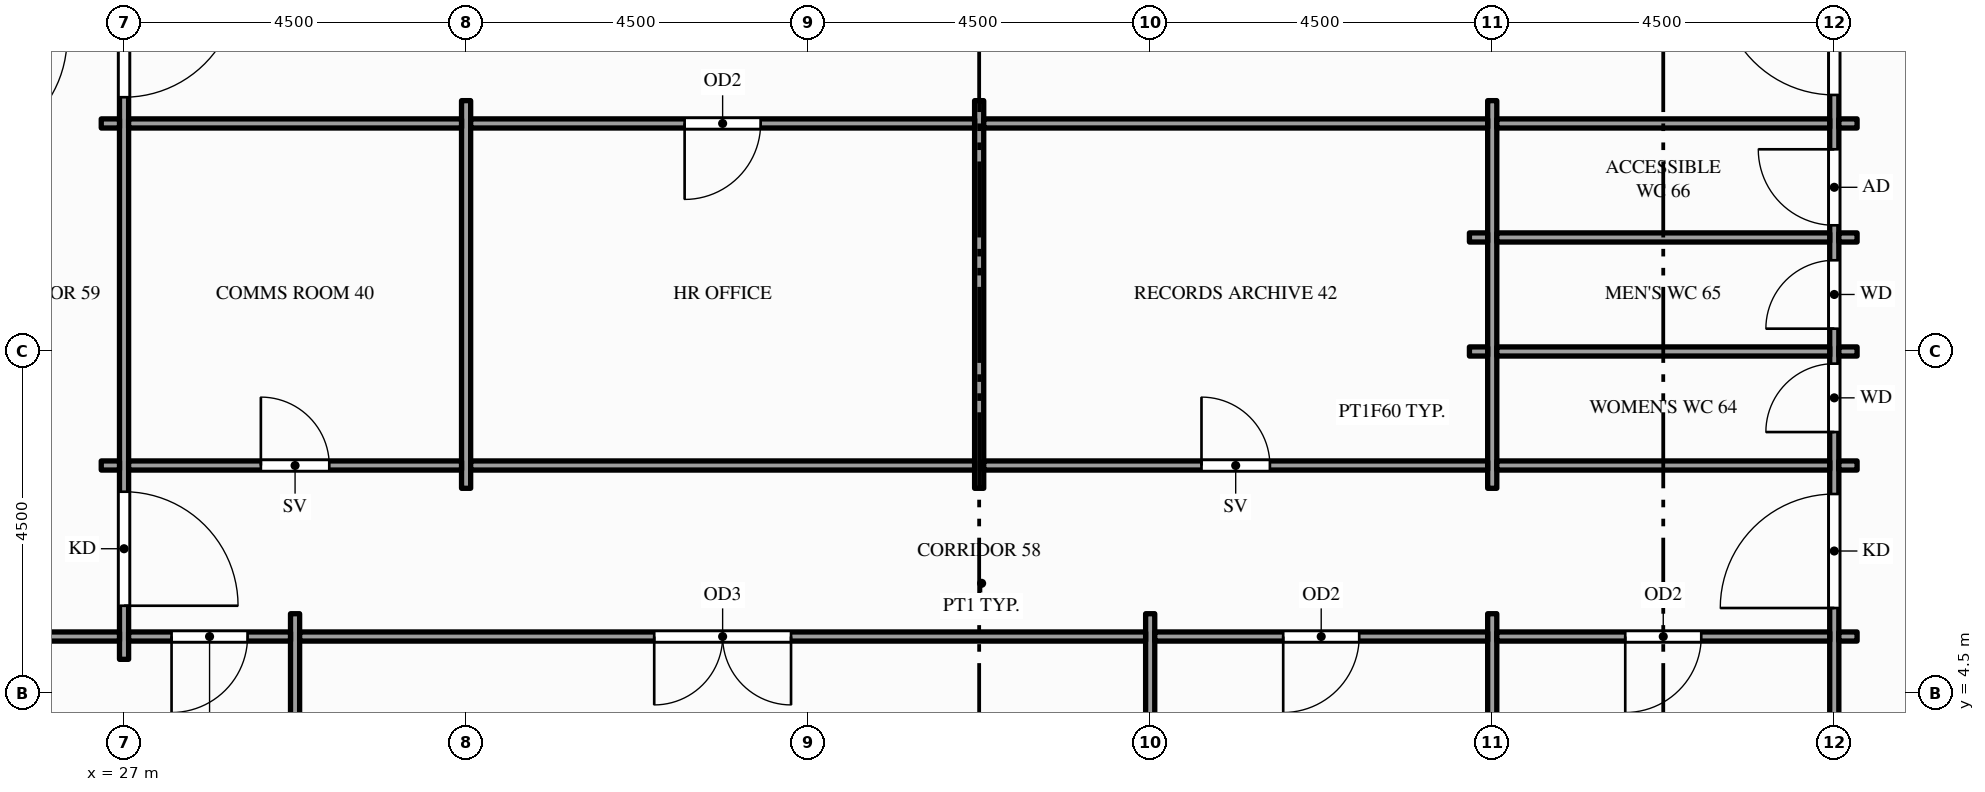
"""IFC4 building model, lengths in metres.
Left out: names, types, materials, properties, quantities, classifications, styles, units other than length and angle.
Written with IfcOpenShell. Run it as: python <this file> out.ifc"""

import sys

from ifc_helpers import new_model, si_unit, direction, frame, frame_2d, origin, place, context, subcontext, project, spatial, rectangle, extrude, element, fill, save


model = new_model("IFC4")
c1 = context("Model", 3, precision=1e-05, world=origin(), true_north=direction((0.0, 1.0)))
c2 = subcontext(c1, "Body", "Model", "MODEL_VIEW")
j1 = project(units=[si_unit("LENGTHUNIT", "METRE"), si_unit("PLANEANGLEUNIT", "RADIAN")], contexts=[c1])
p1 = place(None, origin())
s1 = spatial("IfcSite", under=j1, at=p1, CompositionType="ELEMENT")
p2 = place(p1, origin())
s2 = spatial("IfcBuilding", under=s1, at=p2, CompositionType="ELEMENT")
p3 = place(p2, frame((0.0, 0.0, 239.0)))
s3 = spatial("IfcBuildingStorey", under=s2, at=p3, CompositionType="ELEMENT", Elevation=239.0)
p4 = place(p3, frame((27.0, 4.95, 0.0), z_axis=(0.0, 0.0, 1.0), x_axis=(0.0, 1.0, 0.0)))
e1 = element("IfcWall", 1, at=p4, inside=s3, PredefinedType="PARTITIONING", context=c2, shape_type="SweptSolid", body=[
    extrude(rectangle(XDim=9.6, YDim=0.12, at=frame_2d((4.8, 0.0))), origin(), (0.0, 0.0, 1.0), 2.77),
])
p5 = place(p4, frame((0.705, 0.0, 0.0)))
e2 = element("IfcOpeningElement", 2, at=p5, cuts=e1, PredefinedType="OPENING", context=c2, shape_type="SweptSolid", body=[
    extrude(rectangle(XDim=1.5, YDim=2.1, at=frame_2d((0.75, 1.05))), frame((0.0, 0.07, 0.0), z_axis=(0.0, -1.0, 0.0), x_axis=(1.0, 0.0, 0.0)), (0.0, 0.0, 1.0), 0.14),
])
p6 = place(p4, frame((7.395, 0.0, 0.0)))
e3 = element("IfcOpeningElement", 3, at=p6, cuts=e1, PredefinedType="OPENING", context=c2, shape_type="SweptSolid", body=[
    extrude(rectangle(XDim=1.5, YDim=2.1, at=frame_2d((0.75, 1.05))), frame((0.0, 0.07, 0.0), z_axis=(0.0, -1.0, 0.0), x_axis=(1.0, 0.0, 0.0)), (0.0, 0.0, 1.0), 0.14),
])
p7 = place(p3, frame((29.25, -1.35, 0.0), z_axis=(0.0, 0.0, 1.0), x_axis=(0.0, 1.0, 0.0)))
e4 = element("IfcWall", 4, at=p7, inside=s3, PredefinedType="PARTITIONING", context=c2, shape_type="SweptSolid", body=[
    extrude(rectangle(XDim=6.9, YDim=0.12, at=frame_2d((3.45, 0.0))), origin(), (0.0, 0.0, 1.0), 2.72),
])
for number, where, z_axis, x_axis in (
    (5, (31.5, 7.2, 0.0), (0.0, 0.0, 1.0), (0.0, 1.0, 0.0)),
    (6, (38.25, 7.2, 0.0), (0.0, 0.0, 1.0), (0.0, 1.0, 0.0)),
):
    element("IfcWall", number, at=place(p3, frame(where, z_axis=z_axis, x_axis=x_axis)), inside=s3, PredefinedType="PARTITIONING", context=c2, shape_type="SweptSolid", body=[
        extrude(rectangle(XDim=5.1, YDim=0.12, at=frame_2d((2.55, 0.0))), origin(), (0.0, 0.0, 1.0), 2.77),
    ])
for number, where, z_axis, x_axis in (
    (7, (40.5, -1.35, 0.0), (0.0, 0.0, 1.0), (0.0, 1.0, 0.0)),
    (8, (45.0, -1.35, 0.0), (0.0, 0.0, 1.0), (0.0, 1.0, 0.0)),
):
    element("IfcWall", number, at=place(p3, frame(where, z_axis=z_axis, x_axis=x_axis)), inside=s3, PredefinedType="PARTITIONING", context=c2, shape_type="SweptSolid", body=[
        extrude(rectangle(XDim=6.9, YDim=0.12, at=frame_2d((3.45, 0.0))), origin(), (0.0, 0.0, 1.0), 2.3),
    ])
p8 = place(p3, frame((45.0, 7.2, 0.0), z_axis=(0.0, 0.0, 1.0), x_axis=(0.0, 1.0, 0.0)))
e9 = element("IfcWall", 9, at=p8, inside=s3, PredefinedType="PARTITIONING", context=c2, shape_type="SweptSolid", body=[
    extrude(rectangle(XDim=5.1, YDim=0.12, at=frame_2d((2.55, 0.0))), origin(), (0.0, 0.0, 1.0), 2.77),
])
p9 = place(p3, frame((49.5, -1.35, 0.0), z_axis=(0.0, 0.0, 1.0), x_axis=(0.0, 1.0, 0.0)))
e10 = element("IfcWall", 10, at=p9, inside=s3, PredefinedType="PARTITIONING", context=c2, shape_type="SweptSolid", body=[
    extrude(rectangle(XDim=22.2, YDim=0.12, at=frame_2d((11.1, 0.0))), origin(), (0.0, 0.0, 1.0), 2.3),
])
p10 = place(p9, frame((6.975, 0.0, 0.0)))
e11 = element("IfcOpeningElement", 11, at=p10, cuts=e10, PredefinedType="OPENING", context=c2, shape_type="SweptSolid", body=[
    extrude(rectangle(XDim=1.5, YDim=2.1, at=frame_2d((0.75, 1.05))), frame((0.0, 0.07, 0.0), z_axis=(0.0, -1.0, 0.0), x_axis=(1.0, 0.0, 0.0)), (0.0, 0.0, 1.0), 0.14),
])
p11 = place(p9, frame((13.725, 0.0, 0.0)))
e12 = element("IfcOpeningElement", 12, at=p11, cuts=e10, PredefinedType="OPENING", context=c2, shape_type="SweptSolid", body=[
    extrude(rectangle(XDim=1.5, YDim=2.1, at=frame_2d((0.75, 1.05))), frame((0.0, 0.07, 0.0), z_axis=(0.0, -1.0, 0.0), x_axis=(1.0, 0.0, 0.0)), (0.0, 0.0, 1.0), 0.14),
])
p12 = place(p9, frame((9.29, 0.0, 0.0)))
e13 = element("IfcOpeningElement", 13, at=p12, cuts=e10, PredefinedType="OPENING", context=c2, shape_type="SweptSolid", body=[
    extrude(rectangle(XDim=0.9, YDim=2.1, at=frame_2d((0.45, 1.05))), frame((0.0, 0.07, 0.0), z_axis=(0.0, -1.0, 0.0), x_axis=(1.0, 0.0, 0.0)), (0.0, 0.0, 1.0), 0.14),
])
p13 = place(p9, frame((10.65, 0.0, 0.0)))
e14 = element("IfcOpeningElement", 14, at=p13, cuts=e10, PredefinedType="OPENING", context=c2, shape_type="SweptSolid", body=[
    extrude(rectangle(XDim=0.9, YDim=2.1, at=frame_2d((0.45, 1.05))), frame((0.0, 0.07, 0.0), z_axis=(0.0, -1.0, 0.0), x_axis=(1.0, 0.0, 0.0)), (0.0, 0.0, 1.0), 0.14),
])
p14 = place(p9, frame((12.01, 0.0, 0.0)))
e15 = element("IfcOpeningElement", 15, at=p14, cuts=e10, PredefinedType="OPENING", context=c2, shape_type="SweptSolid", body=[
    extrude(rectangle(XDim=1.0, YDim=2.1, at=frame_2d((0.5, 1.05))), frame((0.0, 0.07, 0.0), z_axis=(0.0, -1.0, 0.0), x_axis=(1.0, 0.0, 0.0)), (0.0, 0.0, 1.0), 0.14),
])
p15 = place(p3, frame((24.81, 5.25, 0.0), z_axis=(0.0, 0.0, 1.0), x_axis=(1.0, 0.0, 0.0)))
e16 = element("IfcWall", 16, at=p15, inside=s3, PredefinedType="PARTITIONING", context=c2, shape_type="SweptSolid", body=[
    extrude(rectangle(XDim=2.13, YDim=0.12, at=frame_2d((1.065, 0.0))), origin(), (0.0, 0.0, 1.0), 2.77),
])
p16 = place(p3, frame((27.06, 5.25, 0.0), z_axis=(0.0, 0.0, 1.0), x_axis=(1.0, 0.0, 0.0)))
e17 = element("IfcWall", 17, at=p16, inside=s3, PredefinedType="PARTITIONING", context=c2, shape_type="SweptSolid", body=[
    extrude(rectangle(XDim=2.13, YDim=0.12, at=frame_2d((1.065, 0.0))), origin(), (0.0, 0.0, 1.0), 2.77),
])
p17 = place(p16, frame((0.565, 0.0, 0.0)))
e18 = element("IfcOpeningElement", 18, at=p17, cuts=e17, PredefinedType="OPENING", context=c2, shape_type="SweptSolid", body=[
    extrude(rectangle(XDim=1.0, YDim=2.1, at=frame_2d((0.5, 1.05))), frame((0.0, 0.07, 0.0), z_axis=(0.0, -1.0, 0.0), x_axis=(1.0, 0.0, 0.0)), (0.0, 0.0, 1.0), 0.14),
])
p18 = place(p3, frame((29.31, 5.25, 0.0), z_axis=(0.0, 0.0, 1.0), x_axis=(1.0, 0.0, 0.0)))
e19 = element("IfcWall", 19, at=p18, inside=s3, PredefinedType="PARTITIONING", context=c2, shape_type="SweptSolid", body=[
    extrude(rectangle(XDim=11.13, YDim=0.12, at=frame_2d((5.565, 0.0))), origin(), (0.0, 0.0, 1.0), 2.77),
])
p19 = place(p18, frame((4.665, 0.0, 0.0)))
e20 = element("IfcOpeningElement", 20, at=p19, cuts=e19, PredefinedType="OPENING", context=c2, shape_type="SweptSolid", body=[
    extrude(rectangle(XDim=1.8, YDim=2.1, at=frame_2d((0.9, 1.05))), frame((0.0, 0.07, 0.0), z_axis=(0.0, -1.0, 0.0), x_axis=(1.0, 0.0, 0.0)), (0.0, 0.0, 1.0), 0.14),
])
p20 = place(p3, frame((40.56, 5.25, 0.0), z_axis=(0.0, 0.0, 1.0), x_axis=(1.0, 0.0, 0.0)))
e21 = element("IfcWall", 21, at=p20, inside=s3, PredefinedType="PARTITIONING", context=c2, shape_type="SweptSolid", body=[
    extrude(rectangle(XDim=4.38, YDim=0.12, at=frame_2d((2.19, 0.0))), origin(), (0.0, 0.0, 1.0), 2.77),
])
p21 = place(p20, frame((1.69, 0.0, 0.0)))
e22 = element("IfcOpeningElement", 22, at=p21, cuts=e21, PredefinedType="OPENING", context=c2, shape_type="SweptSolid", body=[
    extrude(rectangle(XDim=1.0, YDim=2.1, at=frame_2d((0.5, 1.05))), frame((0.0, 0.07, 0.0), z_axis=(0.0, -1.0, 0.0), x_axis=(1.0, 0.0, 0.0)), (0.0, 0.0, 1.0), 0.14),
])
p22 = place(p3, frame((45.06, 5.25, 0.0), z_axis=(0.0, 0.0, 1.0), x_axis=(1.0, 0.0, 0.0)))
e23 = element("IfcWall", 23, at=p22, inside=s3, PredefinedType="PARTITIONING", context=c2, shape_type="SweptSolid", body=[
    extrude(rectangle(XDim=4.38, YDim=0.12, at=frame_2d((2.19, 0.0))), origin(), (0.0, 0.0, 1.0), 2.77),
])
p23 = place(p22, frame((1.69, 0.0, 0.0)))
e24 = element("IfcOpeningElement", 24, at=p23, cuts=e23, PredefinedType="OPENING", context=c2, shape_type="SweptSolid", body=[
    extrude(rectangle(XDim=1.0, YDim=2.1, at=frame_2d((0.5, 1.05))), frame((0.0, 0.07, 0.0), z_axis=(0.0, -1.0, 0.0), x_axis=(1.0, 0.0, 0.0)), (0.0, 0.0, 1.0), 0.14),
])
for number, where, z_axis, x_axis in (
    (25, (49.56, 5.25, 0.0), (0.0, 0.0, 1.0), (1.0, 0.0, 0.0)),
    (26, (26.7, 7.5, 0.0), (0.0, 0.0, 1.0), (1.0, 0.0, 0.0)),
):
    element("IfcWall", number, at=place(p3, frame(where, z_axis=z_axis, x_axis=x_axis)), inside=s3, PredefinedType="PARTITIONING", context=c2, shape_type="SweptSolid", body=[
        extrude(rectangle(XDim=0.24, YDim=0.12, at=frame_2d((0.12, 0.0))), origin(), (0.0, 0.0, 1.0), 2.77),
    ])
p24 = place(p3, frame((27.06, 7.5, 0.0), z_axis=(0.0, 0.0, 1.0), x_axis=(1.0, 0.0, 0.0)))
e27 = element("IfcWall", 27, at=p24, inside=s3, PredefinedType="PARTITIONING", context=c2, shape_type="SweptSolid", body=[
    extrude(rectangle(XDim=4.38, YDim=0.12, at=frame_2d((2.19, 0.0))), origin(), (0.0, 0.0, 1.0), 2.77),
])
p25 = place(p24, frame((1.74, 0.0, 0.0)))
e28 = element("IfcOpeningElement", 28, at=p25, cuts=e27, PredefinedType="OPENING", context=c2, shape_type="SweptSolid", body=[
    extrude(rectangle(XDim=0.9, YDim=2.1, at=frame_2d((0.45, 1.05))), frame((0.0, 0.07, 0.0), z_axis=(0.0, -1.0, 0.0), x_axis=(1.0, 0.0, 0.0)), (0.0, 0.0, 1.0), 0.14),
])
p26 = place(p3, frame((31.56, 7.5, 0.0), z_axis=(0.0, 0.0, 1.0), x_axis=(1.0, 0.0, 0.0)))
e29 = element("IfcWall", 29, at=p26, inside=s3, PredefinedType="PARTITIONING", context=c2, shape_type="SweptSolid", body=[
    extrude(rectangle(XDim=6.63, YDim=0.12, at=frame_2d((3.315, 0.0))), origin(), (0.0, 0.0, 1.0), 2.77),
])
p27 = place(p3, frame((38.31, 7.5, 0.0), z_axis=(0.0, 0.0, 1.0), x_axis=(1.0, 0.0, 0.0)))
e30 = element("IfcWall", 30, at=p27, inside=s3, PredefinedType="PARTITIONING", context=c2, shape_type="SweptSolid", body=[
    extrude(rectangle(XDim=6.63, YDim=0.12, at=frame_2d((3.315, 0.0))), origin(), (0.0, 0.0, 1.0), 2.77),
])
p28 = place(p27, frame((2.865, 0.0, 0.0)))
e31 = element("IfcOpeningElement", 31, at=p28, cuts=e30, PredefinedType="OPENING", context=c2, shape_type="SweptSolid", body=[
    extrude(rectangle(XDim=0.9, YDim=2.1, at=frame_2d((0.45, 1.05))), frame((0.0, 0.07, 0.0), z_axis=(0.0, -1.0, 0.0), x_axis=(1.0, 0.0, 0.0)), (0.0, 0.0, 1.0), 0.14),
])
p29 = place(p3, frame((45.06, 7.5, 0.0), z_axis=(0.0, 0.0, 1.0), x_axis=(1.0, 0.0, 0.0)))
e32 = element("IfcWall", 32, at=p29, inside=s3, PredefinedType="PARTITIONING", context=c2, shape_type="SweptSolid", body=[
    extrude(rectangle(XDim=4.38, YDim=0.12, at=frame_2d((2.19, 0.0))), origin(), (0.0, 0.0, 1.0), 2.77),
])
for number, where, z_axis, x_axis in (
    (33, (49.56, 7.5, 0.0), (0.0, 0.0, 1.0), (1.0, 0.0, 0.0)),
    (34, (44.7, 9.0, 0.0), (0.0, 0.0, 1.0), (1.0, 0.0, 0.0)),
):
    element("IfcWall", number, at=place(p3, frame(where, z_axis=z_axis, x_axis=x_axis)), inside=s3, PredefinedType="PARTITIONING", context=c2, shape_type="SweptSolid", body=[
        extrude(rectangle(XDim=0.24, YDim=0.12, at=frame_2d((0.12, 0.0))), origin(), (0.0, 0.0, 1.0), 2.77),
    ])
p30 = place(p3, frame((45.06, 9.0, 0.0), z_axis=(0.0, 0.0, 1.0), x_axis=(1.0, 0.0, 0.0)))
e35 = element("IfcWall", 35, at=p30, inside=s3, PredefinedType="PARTITIONING", context=c2, shape_type="SweptSolid", body=[
    extrude(rectangle(XDim=4.38, YDim=0.12, at=frame_2d((2.19, 0.0))), origin(), (0.0, 0.0, 1.0), 2.77),
])
for number, where, z_axis, x_axis in (
    (36, (49.56, 9.0, 0.0), (0.0, 0.0, 1.0), (1.0, 0.0, 0.0)),
    (37, (44.7, 10.5, 0.0), (0.0, 0.0, 1.0), (1.0, 0.0, 0.0)),
):
    element("IfcWall", number, at=place(p3, frame(where, z_axis=z_axis, x_axis=x_axis)), inside=s3, PredefinedType="PARTITIONING", context=c2, shape_type="SweptSolid", body=[
        extrude(rectangle(XDim=0.24, YDim=0.12, at=frame_2d((0.12, 0.0))), origin(), (0.0, 0.0, 1.0), 2.77),
    ])
p31 = place(p3, frame((45.06, 10.5, 0.0), z_axis=(0.0, 0.0, 1.0), x_axis=(1.0, 0.0, 0.0)))
e38 = element("IfcWall", 38, at=p31, inside=s3, PredefinedType="PARTITIONING", context=c2, shape_type="SweptSolid", body=[
    extrude(rectangle(XDim=4.38, YDim=0.12, at=frame_2d((2.19, 0.0))), origin(), (0.0, 0.0, 1.0), 2.77),
])
for number, where, z_axis, x_axis in (
    (39, (49.56, 10.5, 0.0), (0.0, 0.0, 1.0), (1.0, 0.0, 0.0)),
    (40, (26.7, 12.0, 0.0), (0.0, 0.0, 1.0), (1.0, 0.0, 0.0)),
):
    element("IfcWall", number, at=place(p3, frame(where, z_axis=z_axis, x_axis=x_axis)), inside=s3, PredefinedType="PARTITIONING", context=c2, shape_type="SweptSolid", body=[
        extrude(rectangle(XDim=0.24, YDim=0.12, at=frame_2d((0.12, 0.0))), origin(), (0.0, 0.0, 1.0), 2.77),
    ])
p32 = place(p3, frame((27.06, 12.0, 0.0), z_axis=(0.0, 0.0, 1.0), x_axis=(1.0, 0.0, 0.0)))
e41 = element("IfcWall", 41, at=p32, inside=s3, PredefinedType="PARTITIONING", context=c2, shape_type="SweptSolid", body=[
    extrude(rectangle(XDim=4.38, YDim=0.12, at=frame_2d((2.19, 0.0))), origin(), (0.0, 0.0, 1.0), 2.77),
])
p33 = place(p3, frame((31.56, 12.0, 0.0), z_axis=(0.0, 0.0, 1.0), x_axis=(1.0, 0.0, 0.0)))
e42 = element("IfcWall", 42, at=p33, inside=s3, PredefinedType="PARTITIONING", context=c2, shape_type="SweptSolid", body=[
    extrude(rectangle(XDim=6.63, YDim=0.12, at=frame_2d((3.315, 0.0))), origin(), (0.0, 0.0, 1.0), 2.77),
])
p34 = place(p33, frame((2.815, 0.0, 0.0)))
e43 = element("IfcOpeningElement", 43, at=p34, cuts=e42, PredefinedType="OPENING", context=c2, shape_type="SweptSolid", body=[
    extrude(rectangle(XDim=1.0, YDim=2.1, at=frame_2d((0.5, 1.05))), frame((0.0, 0.07, 0.0), z_axis=(0.0, -1.0, 0.0), x_axis=(1.0, 0.0, 0.0)), (0.0, 0.0, 1.0), 0.14),
])
p35 = place(p3, frame((38.31, 12.0, 0.0), z_axis=(0.0, 0.0, 1.0), x_axis=(1.0, 0.0, 0.0)))
e44 = element("IfcWall", 44, at=p35, inside=s3, PredefinedType="PARTITIONING", context=c2, shape_type="SweptSolid", body=[
    extrude(rectangle(XDim=6.63, YDim=0.12, at=frame_2d((3.315, 0.0))), origin(), (0.0, 0.0, 1.0), 2.77),
])
p36 = place(p3, frame((45.06, 12.0, 0.0), z_axis=(0.0, 0.0, 1.0), x_axis=(1.0, 0.0, 0.0)))
e45 = element("IfcWall", 45, at=p36, inside=s3, PredefinedType="PARTITIONING", context=c2, shape_type="SweptSolid", body=[
    extrude(rectangle(XDim=4.38, YDim=0.12, at=frame_2d((2.19, 0.0))), origin(), (0.0, 0.0, 1.0), 2.77),
])
p37 = place(p3, frame((49.56, 12.0, 0.0), z_axis=(0.0, 0.0, 1.0), x_axis=(1.0, 0.0, 0.0)))
e46 = element("IfcWall", 46, at=p37, inside=s3, PredefinedType="PARTITIONING", context=c2, shape_type="SweptSolid", body=[
    extrude(rectangle(XDim=0.24, YDim=0.12, at=frame_2d((0.12, 0.0))), origin(), (0.0, 0.0, 1.0), 2.77),
])
p38 = place(p5, origin())
e47 = element("IfcDoor", 47, at=p38, inside=s3, OperationType="SINGLE_SWING_LEFT", PredefinedType="DOOR", context=c2, shape_type="SweptSolid", body=[
    extrude(rectangle(XDim=1.5, YDim=2.1, at=frame_2d((0.75, 1.05))), frame((0.0, 0.025, 0.0), z_axis=(0.0, -1.0, 0.0), x_axis=(1.0, 0.0, 0.0)), (0.0, 0.0, 1.0), 0.05),
])
fill(e2, e47)
p39 = place(p6, origin())
e48 = element("IfcDoor", 48, at=p39, inside=s3, OperationType="SINGLE_SWING_RIGHT", PredefinedType="DOOR", context=c2, shape_type="SweptSolid", body=[
    extrude(rectangle(XDim=1.5, YDim=2.1, at=frame_2d((0.75, 1.05))), frame((0.0, 0.025, 0.0), z_axis=(0.0, -1.0, 0.0), x_axis=(1.0, 0.0, 0.0)), (0.0, 0.0, 1.0), 0.05),
])
fill(e3, e48)
p40 = place(p10, origin())
e49 = element("IfcDoor", 49, at=p40, inside=s3, OperationType="SINGLE_SWING_LEFT", PredefinedType="DOOR", context=c2, shape_type="SweptSolid", body=[
    extrude(rectangle(XDim=1.5, YDim=2.1, at=frame_2d((0.75, 1.05))), frame((0.0, 0.025, 0.0), z_axis=(0.0, -1.0, 0.0), x_axis=(1.0, 0.0, 0.0)), (0.0, 0.0, 1.0), 0.05),
])
fill(e11, e49)
p41 = place(p11, origin())
e50 = element("IfcDoor", 50, at=p41, inside=s3, OperationType="SINGLE_SWING_RIGHT", PredefinedType="DOOR", context=c2, shape_type="SweptSolid", body=[
    extrude(rectangle(XDim=1.5, YDim=2.1, at=frame_2d((0.75, 1.05))), frame((0.0, 0.025, 0.0), z_axis=(0.0, -1.0, 0.0), x_axis=(1.0, 0.0, 0.0)), (0.0, 0.0, 1.0), 0.05),
])
fill(e12, e50)
p42 = place(p25, origin())
e51 = element("IfcDoor", 51, at=p42, inside=s3, OperationType="SINGLE_SWING_LEFT", PredefinedType="DOOR", context=c2, shape_type="SweptSolid", body=[
    extrude(rectangle(XDim=0.9, YDim=2.1, at=frame_2d((0.45, 1.05))), frame((0.0, 0.025, 0.0), z_axis=(0.0, -1.0, 0.0), x_axis=(1.0, 0.0, 0.0)), (0.0, 0.0, 1.0), 0.05),
])
fill(e28, e51)
p43 = place(p34, origin())
e52 = element("IfcDoor", 52, at=p43, inside=s3, OperationType="SINGLE_SWING_LEFT", PredefinedType="DOOR", context=c2, shape_type="SweptSolid", body=[
    extrude(rectangle(XDim=1.0, YDim=2.1, at=frame_2d((0.5, 1.05))), frame((0.0, 0.025, 0.0), z_axis=(0.0, -1.0, 0.0), x_axis=(1.0, 0.0, 0.0)), (0.0, 0.0, 1.0), 0.05),
])
fill(e43, e52)
p44 = place(p28, origin())
e53 = element("IfcDoor", 53, at=p44, inside=s3, OperationType="SINGLE_SWING_LEFT", PredefinedType="DOOR", context=c2, shape_type="SweptSolid", body=[
    extrude(rectangle(XDim=0.9, YDim=2.1, at=frame_2d((0.45, 1.05))), frame((0.0, 0.025, 0.0), z_axis=(0.0, -1.0, 0.0), x_axis=(1.0, 0.0, 0.0)), (0.0, 0.0, 1.0), 0.05),
])
fill(e31, e53)
p45 = place(p12, origin())
e54 = element("IfcDoor", 54, at=p45, inside=s3, OperationType="SINGLE_SWING_LEFT", PredefinedType="DOOR", context=c2, shape_type="SweptSolid", body=[
    extrude(rectangle(XDim=0.9, YDim=2.1, at=frame_2d((0.45, 1.05))), frame((0.0, 0.025, 0.0), z_axis=(0.0, -1.0, 0.0), x_axis=(1.0, 0.0, 0.0)), (0.0, 0.0, 1.0), 0.05),
])
fill(e13, e54)
p46 = place(p13, origin())
e55 = element("IfcDoor", 55, at=p46, inside=s3, OperationType="SINGLE_SWING_LEFT", PredefinedType="DOOR", context=c2, shape_type="SweptSolid", body=[
    extrude(rectangle(XDim=0.9, YDim=2.1, at=frame_2d((0.45, 1.05))), frame((0.0, 0.025, 0.0), z_axis=(0.0, -1.0, 0.0), x_axis=(1.0, 0.0, 0.0)), (0.0, 0.0, 1.0), 0.05),
])
fill(e14, e55)
p47 = place(p14, origin())
e56 = element("IfcDoor", 56, at=p47, inside=s3, OperationType="SINGLE_SWING_RIGHT", PredefinedType="DOOR", context=c2, shape_type="SweptSolid", body=[
    extrude(rectangle(XDim=1.0, YDim=2.1, at=frame_2d((0.5, 1.05))), frame((0.0, 0.025, 0.0), z_axis=(0.0, -1.0, 0.0), x_axis=(1.0, 0.0, 0.0)), (0.0, 0.0, 1.0), 0.05),
])
fill(e15, e56)
p48 = place(p17, origin())
e57 = element("IfcDoor", 57, at=p48, inside=s3, OperationType="SINGLE_SWING_LEFT", PredefinedType="DOOR", context=c2, shape_type="SweptSolid", body=[
    extrude(rectangle(XDim=1.0, YDim=2.1, at=frame_2d((0.5, 1.05))), frame((0.0, 0.025, 0.0), z_axis=(0.0, -1.0, 0.0), x_axis=(1.0, 0.0, 0.0)), (0.0, 0.0, 1.0), 0.05),
])
fill(e18, e57)
p49 = place(p19, origin())
e58 = element("IfcDoor", 58, at=p49, inside=s3, OperationType="DOUBLE_DOOR_SINGLE_SWING", PredefinedType="DOOR", context=c2, shape_type="SweptSolid", body=[
    extrude(rectangle(XDim=1.8, YDim=2.1, at=frame_2d((0.9, 1.05))), frame((0.0, 0.025, 0.0), z_axis=(0.0, -1.0, 0.0), x_axis=(1.0, 0.0, 0.0)), (0.0, 0.0, 1.0), 0.05),
])
fill(e20, e58)
p50 = place(p21, origin())
e59 = element("IfcDoor", 59, at=p50, inside=s3, OperationType="SINGLE_SWING_LEFT", PredefinedType="DOOR", context=c2, shape_type="SweptSolid", body=[
    extrude(rectangle(XDim=1.0, YDim=2.1, at=frame_2d((0.5, 1.05))), frame((0.0, 0.025, 0.0), z_axis=(0.0, -1.0, 0.0), x_axis=(1.0, 0.0, 0.0)), (0.0, 0.0, 1.0), 0.05),
])
fill(e22, e59)
p51 = place(p23, origin())
e60 = element("IfcDoor", 60, at=p51, inside=s3, OperationType="SINGLE_SWING_LEFT", PredefinedType="DOOR", context=c2, shape_type="SweptSolid", body=[
    extrude(rectangle(XDim=1.0, YDim=2.1, at=frame_2d((0.5, 1.05))), frame((0.0, 0.025, 0.0), z_axis=(0.0, -1.0, 0.0), x_axis=(1.0, 0.0, 0.0)), (0.0, 0.0, 1.0), 0.05),
])
fill(e24, e60)
save(model, sys.argv[1])
